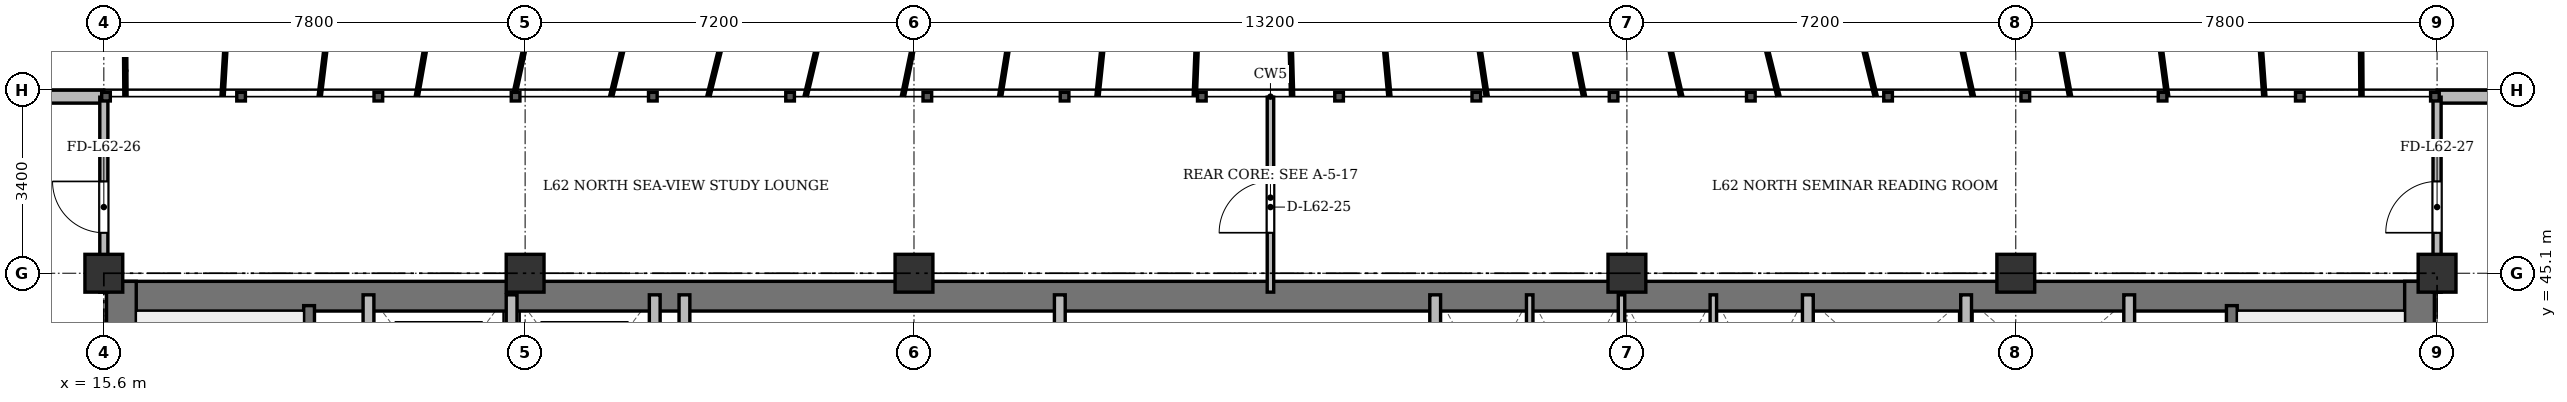
"""IFC4 building model, lengths in metres.
Left out: names, types, materials, properties, quantities, classifications, styles, units other than length and angle.
Written with IfcOpenShell. Run it as: python <this file> out.ifc"""

import sys

from ifc_helpers import new_model, si_unit, direction, frame, frame_2d, origin, origin_2d, place, context, subcontext, project, spatial, rectangle, extrude, source, transform, mapped, element, fill, save


model = new_model("IFC4")
c1 = context("Model", 3, precision=1e-05, world=origin(), true_north=direction((0.0, 1.0)))
c2 = subcontext(c1, "Body", "Model", "MODEL_VIEW")
j1 = project(units=[si_unit("LENGTHUNIT", "METRE"), si_unit("PLANEANGLEUNIT", "RADIAN")], contexts=[c1])
p1 = place(None, origin())
s1 = spatial("IfcSite", under=j1, at=p1, CompositionType="ELEMENT")
p2 = place(p1, origin())
s2 = spatial("IfcBuilding", under=s1, at=p2, CompositionType="ELEMENT")
p3 = place(p2, frame((0.0, 0.0, 237.3)))
s3 = spatial("IfcBuildingStorey", under=s2, at=p3, CompositionType="ELEMENT", Elevation=237.3)
m1 = source(origin(), c2, "Body", "SweptSolid", [
    extrude(rectangle(XDim=0.7, YDim=0.7, at=origin_2d()), origin(), (0.0, 0.0, 1.0), 3.6),
])
for number, where, z_axis, x_axis in (
    (1, (15.6, 45.1, 0.0), (0.0, 0.0, 1.0), (1.0, 0.0, 0.0)),
    (2, (23.4, 45.1, 0.0), (0.0, 0.0, 1.0), (1.0, 0.0, 0.0)),
    (3, (30.6, 45.1, 0.0), (0.0, 0.0, 1.0), (1.0, 0.0, 0.0)),
    (4, (43.8, 45.1, 0.0), (0.0, 0.0, 1.0), (1.0, 0.0, 0.0)),
    (5, (51.0, 45.1, 0.0), (0.0, 0.0, 1.0), (1.0, 0.0, 0.0)),
    (6, (58.8, 45.1, 0.0), (0.0, 0.0, 1.0), (1.0, 0.0, 0.0)),
):
    element("IfcColumn", number, at=place(p3, frame(where, z_axis=z_axis, x_axis=x_axis)), inside=s3, PredefinedType="COLUMN", context=c2, shape_type="MappedRepresentation", body=[
        mapped(m1, transform((0.0, 0.0, 0.0), x_axis=(1.0, 0.0, 0.0), y_axis=(0.0, 1.0, 0.0), z_axis=(0.0, 0.0, 1.0), scale=1.0)),
    ])
p4 = place(p3, frame((11.1, 48.37, 0.0), z_axis=(0.0, 0.0, 1.0), x_axis=(1.0, 0.0, 0.0)))
e7 = element("IfcWall", 7, at=p4, inside=s3, PredefinedType="SOLIDWALL", context=c2, shape_type="SweptSolid", body=[
    extrude(rectangle(XDim=4.5, YDim=0.24, at=frame_2d((2.25, 0.0))), origin(), (0.0, 0.0, 1.0), 3.22),
])
p5 = place(p4, frame((1.65, 0.0, 0.9)))
e8 = element("IfcOpeningElement", 8, at=p5, cuts=e7, PredefinedType="OPENING", context=c2, shape_type="SweptSolid", body=[
    extrude(rectangle(XDim=1.2, YDim=1.65, at=frame_2d((0.6, 0.825))), frame((0.0, 0.13, 0.0), z_axis=(0.0, -1.0, 0.0), x_axis=(1.0, 0.0, 0.0)), (0.0, 0.0, 1.0), 0.26),
])
p6 = place(p3, frame((58.8, 48.37, 0.0), z_axis=(0.0, 0.0, 1.0), x_axis=(1.0, 0.0, 0.0)))
e9 = element("IfcWall", 9, at=p6, inside=s3, PredefinedType="SOLIDWALL", context=c2, shape_type="SweptSolid", body=[
    extrude(rectangle(XDim=4.5, YDim=0.24, at=frame_2d((2.25, 0.0))), origin(), (0.0, 0.0, 1.0), 3.22),
])
p7 = place(p6, frame((1.65, 0.0, 0.9)))
e10 = element("IfcOpeningElement", 10, at=p7, cuts=e9, PredefinedType="OPENING", context=c2, shape_type="SweptSolid", body=[
    extrude(rectangle(XDim=1.2, YDim=1.65, at=frame_2d((0.6, 0.825))), frame((0.0, 0.13, 0.0), z_axis=(0.0, -1.0, 0.0), x_axis=(1.0, 0.0, 0.0)), (0.0, 0.0, 1.0), 0.26),
])
p8 = place(p3, frame((15.65, 44.675, 0.0), z_axis=(0.0, 0.0, 1.0), x_axis=(1.0, 0.0, 0.0)))
e11 = element("IfcWall", 11, at=p8, inside=s3, PredefinedType="SHEAR", context=c2, shape_type="SweptSolid", body=[
    extrude(rectangle(XDim=43.1, YDim=0.55, at=frame_2d((21.55, 0.0))), origin(), (0.0, 0.0, 1.0), 3.22),
])
for number, where, z_axis, x_axis in (
    (12, (15.925, 33.4, 0.0), (0.0, 0.0, 1.0), (0.0, 1.0, 0.0)),
    (13, (58.475, 33.4, 0.0), (0.0, 0.0, 1.0), (0.0, 1.0, 0.0)),
):
    element("IfcWall", number, at=place(p3, frame(where, z_axis=z_axis, x_axis=x_axis)), inside=s3, PredefinedType="SHEAR", context=c2, shape_type="SweptSolid", body=[
        extrude(rectangle(XDim=11.55, YDim=0.55, at=frame_2d((5.775, 0.0))), origin(), (0.0, 0.0, 1.0), 3.22),
    ])
p9 = place(p3, frame((19.4, 33.4, 0.0), z_axis=(0.0, 0.0, 1.0), x_axis=(0.0, 1.0, 0.0)))
e14 = element("IfcWall", 14, at=p9, inside=s3, PredefinedType="SHEAR", context=c2, shape_type="SweptSolid", body=[
    extrude(rectangle(XDim=11.1, YDim=0.2, at=frame_2d((5.55, 0.0))), origin(), (0.0, 0.0, 1.0), 3.22),
])
p10 = place(p9, frame((0.85, 0.0, 0.0)))
e15 = element("IfcOpeningElement", 15, at=p10, cuts=e14, PredefinedType="OPENING", context=c2, shape_type="SweptSolid", body=[
    extrude(rectangle(XDim=1.1, YDim=2.15, at=frame_2d((0.55, 1.075))), frame((0.0, 0.11, 0.0), z_axis=(0.0, -1.0, 0.0), x_axis=(1.0, 0.0, 0.0)), (0.0, 0.0, 1.0), 0.22),
])
p11 = place(p3, frame((55.0, 33.4, 0.0), z_axis=(0.0, 0.0, 1.0), x_axis=(0.0, 1.0, 0.0)))
e16 = element("IfcWall", 16, at=p11, inside=s3, PredefinedType="SHEAR", context=c2, shape_type="SweptSolid", body=[
    extrude(rectangle(XDim=11.1, YDim=0.2, at=frame_2d((5.55, 0.0))), origin(), (0.0, 0.0, 1.0), 3.22),
])
p12 = place(p11, frame((0.85, 0.0, 0.0)))
e17 = element("IfcOpeningElement", 17, at=p12, cuts=e16, PredefinedType="OPENING", context=c2, shape_type="SweptSolid", body=[
    extrude(rectangle(XDim=1.1, YDim=2.15, at=frame_2d((0.55, 1.075))), frame((0.0, 0.11, 0.0), z_axis=(0.0, -1.0, 0.0), x_axis=(1.0, 0.0, 0.0)), (0.0, 0.0, 1.0), 0.22),
])
for number, where, z_axis, x_axis in (
    (18, (20.5, 41.3, 0.0), (0.0, 0.0, 1.0), (0.0, 1.0, 0.0)),
    (19, (23.15, 41.3, 0.0), (0.0, 0.0, 1.0), (0.0, 1.0, 0.0)),
    (20, (25.8, 41.3, 0.0), (0.0, 0.0, 1.0), (0.0, 1.0, 0.0)),
):
    element("IfcWall", number, at=place(p3, frame(where, z_axis=z_axis, x_axis=x_axis)), inside=s3, PredefinedType="SOLIDWALL", context=c2, shape_type="SweptSolid", body=[
        extrude(rectangle(XDim=3.4, YDim=0.2, at=frame_2d((1.7, 0.0))), origin(), (0.0, 0.0, 1.0), 3.22),
    ])
for number, where, z_axis, x_axis in (
    (21, (26.35, 33.4, 0.0), (0.0, 0.0, 1.0), (0.0, 1.0, 0.0)),
    (22, (33.3, 33.4, 0.0), (0.0, 0.0, 1.0), (0.0, 1.0, 0.0)),
):
    element("IfcWall", number, at=place(p3, frame(where, z_axis=z_axis, x_axis=x_axis)), inside=s3, PredefinedType="SOLIDWALL", context=c2, shape_type="SweptSolid", body=[
        extrude(rectangle(XDim=11.3, YDim=0.2, at=frame_2d((5.65, 0.0))), origin(), (0.0, 0.0, 1.0), 2.77),
    ])
p13 = place(p3, frame((40.25, 41.5, 0.0), z_axis=(0.0, 0.0, 1.0), x_axis=(0.0, 1.0, 0.0)))
e23 = element("IfcWall", 23, at=p13, inside=s3, PredefinedType="SOLIDWALL", context=c2, shape_type="SweptSolid", body=[
    extrude(rectangle(XDim=3.2, YDim=0.2, at=frame_2d((1.6, 0.0))), origin(), (0.0, 0.0, 1.0), 3.22),
])
for number, where, z_axis, x_axis in (
    (24, (42.0, 41.5, 0.0), (0.0, 0.0, 1.0), (0.0, 1.0, 0.0)),
    (25, (43.7, 41.5, 0.0), (0.0, 0.0, 1.0), (0.0, 1.0, 0.0)),
    (26, (45.4, 41.5, 0.0), (0.0, 0.0, 1.0), (0.0, 1.0, 0.0)),
):
    element("IfcWall", number, at=place(p3, frame(where, z_axis=z_axis, x_axis=x_axis)), inside=s3, PredefinedType="PARTITIONING", context=c2, shape_type="SweptSolid", body=[
        extrude(rectangle(XDim=3.2, YDim=0.12, at=frame_2d((1.6, 0.0))), origin(), (0.0, 0.0, 1.0), 3.22),
    ])
p14 = place(p3, frame((47.15, 33.4, 0.0), z_axis=(0.0, 0.0, 1.0), x_axis=(0.0, 1.0, 0.0)))
e27 = element("IfcWall", 27, at=p14, inside=s3, PredefinedType="SOLIDWALL", context=c2, shape_type="SweptSolid", body=[
    extrude(rectangle(XDim=11.3, YDim=0.2, at=frame_2d((5.65, 0.0))), origin(), (0.0, 0.0, 1.0), 2.77),
])
for number, where, z_axis, x_axis in (
    (28, (50.08, 42.05, 0.0), (0.0, 0.0, 1.0), (0.0, 1.0, 0.0)),
    (29, (53.1, 42.05, 0.0), (0.0, 0.0, 1.0), (0.0, 1.0, 0.0)),
):
    element("IfcWall", number, at=place(p3, frame(where, z_axis=z_axis, x_axis=x_axis)), inside=s3, PredefinedType="SOLIDWALL", context=c2, shape_type="SweptSolid", body=[
        extrude(rectangle(XDim=2.65, YDim=0.2, at=frame_2d((1.325, 0.0))), origin(), (0.0, 0.0, 1.0), 3.22),
    ])
p15 = place(p3, frame((37.2, 44.75, 0.0), z_axis=(0.0, 0.0, 1.0), x_axis=(0.0, 1.0, 0.0)))
e30 = element("IfcWall", 30, at=p15, inside=s3, PredefinedType="PARTITIONING", context=c2, shape_type="SweptSolid", body=[
    extrude(rectangle(XDim=3.61, YDim=0.12, at=frame_2d((1.805, 0.0))), origin(), (0.0, 0.0, 1.0), 2.77),
])
p16 = place(p15, frame((1.1, 0.0, 0.0)))
e31 = element("IfcOpeningElement", 31, at=p16, cuts=e30, PredefinedType="OPENING", context=c2, shape_type="SweptSolid", body=[
    extrude(rectangle(XDim=0.95, YDim=2.15, at=frame_2d((0.475, 1.075))), frame((0.0, 0.07, 0.0), z_axis=(0.0, -1.0, 0.0), x_axis=(1.0, 0.0, 0.0)), (0.0, 0.0, 1.0), 0.14),
])
p17 = place(p3, frame((15.6, 44.75, 0.0), z_axis=(0.0, 0.0, 1.0), x_axis=(0.0, 1.0, 0.0)))
e32 = element("IfcWall", 32, at=p17, inside=s3, PredefinedType="PARTITIONING", context=c2, shape_type="SweptSolid", body=[
    extrude(rectangle(XDim=3.61, YDim=0.15, at=frame_2d((1.805, 0.0))), origin(), (0.0, 0.0, 1.0), 2.72),
])
p18 = place(p17, frame((1.1, 0.0, 0.0)))
e33 = element("IfcOpeningElement", 33, at=p18, cuts=e32, PredefinedType="OPENING", context=c2, shape_type="SweptSolid", body=[
    extrude(rectangle(XDim=0.95, YDim=2.15, at=frame_2d((0.475, 1.075))), frame((0.0, 0.085, 0.0), z_axis=(0.0, -1.0, 0.0), x_axis=(1.0, 0.0, 0.0)), (0.0, 0.0, 1.0), 0.17),
])
p19 = place(p3, frame((58.8, 44.75, 0.0), z_axis=(0.0, 0.0, 1.0), x_axis=(0.0, 1.0, 0.0)))
e34 = element("IfcWall", 34, at=p19, inside=s3, PredefinedType="PARTITIONING", context=c2, shape_type="SweptSolid", body=[
    extrude(rectangle(XDim=3.61, YDim=0.15, at=frame_2d((1.805, 0.0))), origin(), (0.0, 0.0, 1.0), 2.72),
])
p20 = place(p19, frame((1.1, 0.0, 0.0)))
e35 = element("IfcOpeningElement", 35, at=p20, cuts=e34, PredefinedType="OPENING", context=c2, shape_type="SweptSolid", body=[
    extrude(rectangle(XDim=0.95, YDim=2.15, at=frame_2d((0.475, 1.075))), frame((0.0, 0.085, 0.0), z_axis=(0.0, -1.0, 0.0), x_axis=(1.0, 0.0, 0.0)), (0.0, 0.0, 1.0), 0.17),
])
m2 = source(origin(), c2, "Body", "SweptSolid", [
    extrude(rectangle(XDim=0.95, YDim=2.15, at=frame_2d((0.475, 1.075))), frame((0.0, 0.025, 0.0), z_axis=(0.0, -1.0, 0.0), x_axis=(1.0, 0.0, 0.0)), (0.0, 0.0, 1.0), 0.05),
])
p21 = place(p16, origin())
e36 = element("IfcDoor", 36, at=p21, inside=s3, OperationType="SINGLE_SWING_LEFT", PredefinedType="DOOR", context=c2, shape_type="MappedRepresentation", body=[
    mapped(m2, transform((0.0, 0.0, 0.0), x_axis=(1.0, 0.0, 0.0), y_axis=(0.0, 1.0, 0.0), z_axis=(0.0, 0.0, 1.0), scale=1.0)),
])
fill(e31, e36)
p22 = place(p18, origin())
e37 = element("IfcDoor", 37, at=p22, inside=s3, OperationType="SINGLE_SWING_RIGHT", PredefinedType="DOOR", context=c2, shape_type="MappedRepresentation", body=[
    mapped(m2, transform((0.0, 0.0, 0.0), x_axis=(1.0, 0.0, 0.0), y_axis=(0.0, 1.0, 0.0), z_axis=(0.0, 0.0, 1.0), scale=1.0)),
])
fill(e33, e37)
p23 = place(p20, origin())
e38 = element("IfcDoor", 38, at=p23, inside=s3, OperationType="SINGLE_SWING_LEFT", PredefinedType="DOOR", context=c2, shape_type="MappedRepresentation", body=[
    mapped(m2, transform((0.0, 0.0, 0.0), x_axis=(1.0, 0.0, 0.0), y_axis=(0.0, 1.0, 0.0), z_axis=(0.0, 0.0, 1.0), scale=1.0)),
])
fill(e35, e38)
save(model, sys.argv[1])
